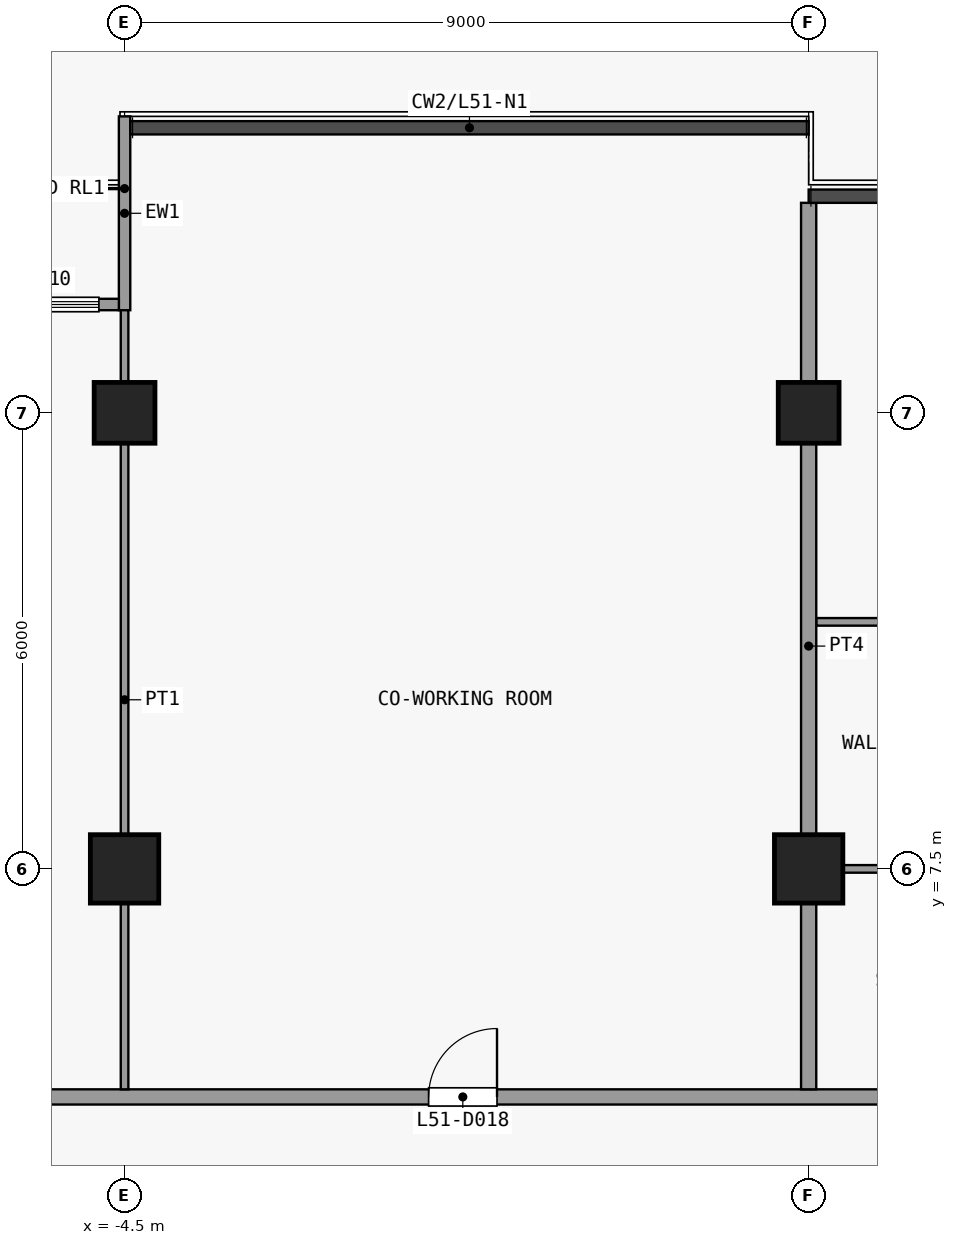
"""IFC4 building model, lengths in metres.
Left out: names, types, materials, properties, quantities, classifications, styles, units other than length and angle.
Written with IfcOpenShell. Run it as: python <this file> out.ifc"""

import sys

from ifc_helpers import new_model, si_unit, direction, frame, frame_2d, origin, origin_2d, place, context, subcontext, project, spatial, rectangle, extrude, element, fill, save


model = new_model("IFC4")
c1 = context("Model", 3, precision=1e-05, world=origin(), true_north=direction((0.0, 1.0)))
c2 = subcontext(c1, "Body", "Model", "MODEL_VIEW")
j1 = project(units=[si_unit("LENGTHUNIT", "METRE"), si_unit("PLANEANGLEUNIT", "RADIAN")], contexts=[c1])
p1 = place(None, origin())
s1 = spatial("IfcSite", under=j1, at=p1, CompositionType="ELEMENT")
p2 = place(p1, origin())
s2 = spatial("IfcBuilding", under=s1, at=p2, CompositionType="ELEMENT")
p3 = place(p2, frame((0.0, 0.0, 205.1)))
s3 = spatial("IfcBuildingStorey", under=s2, at=p3, CompositionType="ELEMENT", Elevation=205.1)
p4 = place(p3, frame((-4.5, 7.5, 0.0), z_axis=(0.0, 0.0, 1.0), x_axis=(1.0, 0.0, 0.0)))
e1 = element("IfcColumn", 1, at=p4, inside=s3, PredefinedType="COLUMN", context=c2, shape_type="SweptSolid", body=[
    extrude(rectangle(XDim=0.9, YDim=0.9, at=origin_2d()), origin(), (0.0, 0.0, 1.0), 3.6),
])
p5 = place(p3, frame((-4.5, 13.5, 0.0), z_axis=(0.0, 0.0, 1.0), x_axis=(1.0, 0.0, 0.0)))
e2 = element("IfcColumn", 2, at=p5, inside=s3, PredefinedType="COLUMN", context=c2, shape_type="SweptSolid", body=[
    extrude(rectangle(XDim=0.8, YDim=0.8, at=origin_2d()), origin(), (0.0, 0.0, 1.0), 3.6),
])
p6 = place(p3, frame((4.5, 7.5, 0.0), z_axis=(0.0, 0.0, 1.0), x_axis=(1.0, 0.0, 0.0)))
e3 = element("IfcColumn", 3, at=p6, inside=s3, PredefinedType="COLUMN", context=c2, shape_type="SweptSolid", body=[
    extrude(rectangle(XDim=0.9, YDim=0.9, at=origin_2d()), origin(), (0.0, 0.0, 1.0), 3.6),
])
p7 = place(p3, frame((4.5, 13.5, 0.0), z_axis=(0.0, 0.0, 1.0), x_axis=(1.0, 0.0, 0.0)))
e4 = element("IfcColumn", 4, at=p7, inside=s3, PredefinedType="COLUMN", context=c2, shape_type="SweptSolid", body=[
    extrude(rectangle(XDim=0.8, YDim=0.8, at=origin_2d()), origin(), (0.0, 0.0, 1.0), 3.6),
])
p8 = place(p3, frame((-4.5, 14.85, 0.0), z_axis=(0.0, 0.0, 1.0), x_axis=(0.0, 1.0, 0.0)))
e5 = element("IfcWall", 5, at=p8, inside=s3, PredefinedType="SOLIDWALL", context=c2, shape_type="SweptSolid", body=[
    extrude(rectangle(XDim=2.55, YDim=0.15, at=frame_2d((1.275, 0.0))), origin(), (0.0, 0.0, 1.0), 3.3),
])
p9 = place(p3, frame((-10.425, 14.925, 0.0), z_axis=(0.0, 0.0, 1.0), x_axis=(1.0, 0.0, 0.0)))
e6 = element("IfcWall", 6, at=p9, inside=s3, PredefinedType="SOLIDWALL", context=c2, shape_type="SweptSolid", body=[
    extrude(rectangle(XDim=5.85, YDim=0.15, at=frame_2d((2.925, 0.0))), origin(), (0.0, 0.0, 1.0), 3.3),
])
p10 = place(p9, frame((2.325, 0.0, 0.0)))
e7 = element("IfcOpeningElement", 7, at=p10, cuts=e6, PredefinedType="OPENING", context=c2, shape_type="SweptSolid", body=[
    extrude(rectangle(XDim=1.2, YDim=2.4, at=frame_2d((0.6, 1.2))), frame((0.0, 0.085, 0.0), z_axis=(0.0, -1.0, 0.0), x_axis=(1.0, 0.0, 0.0)), (0.0, 0.0, 1.0), 0.17),
])
p11 = place(p9, frame((0.262, 0.0, 0.9)))
e8 = element("IfcOpeningElement", 8, at=p11, cuts=e6, PredefinedType="OPENING", context=c2, shape_type="SweptSolid", body=[
    extrude(rectangle(XDim=1.8, YDim=2.1, at=frame_2d((0.9, 1.05))), frame((0.0, 0.085, 0.0), z_axis=(0.0, -1.0, 0.0), x_axis=(1.0, 0.0, 0.0)), (0.0, 0.0, 1.0), 0.17),
])
p12 = place(p9, frame((3.788, 0.0, 0.9)))
e9 = element("IfcOpeningElement", 9, at=p12, cuts=e6, PredefinedType="OPENING", context=c2, shape_type="SweptSolid", body=[
    extrude(rectangle(XDim=1.8, YDim=2.1, at=frame_2d((0.9, 1.05))), frame((0.0, 0.085, 0.0), z_axis=(0.0, -1.0, 0.0), x_axis=(1.0, 0.0, 0.0)), (0.0, 0.0, 1.0), 0.17),
])
p13 = place(p3, frame((-19.35, 4.5, 0.0), z_axis=(0.0, 0.0, 1.0), x_axis=(1.0, 0.0, 0.0)))
e10 = element("IfcWall", 10, at=p13, inside=s3, PredefinedType="PARTITIONING", context=c2, shape_type="SweptSolid", body=[
    extrude(rectangle(XDim=38.7, YDim=0.2, at=frame_2d((19.35, 0.0))), origin(), (0.0, 0.0, 1.0), 3.3),
])
p14 = place(p13, frame((4.55, 0.0, 0.0)))
e11 = element("IfcOpeningElement", 11, at=p14, cuts=e10, PredefinedType="OPENING", context=c2, shape_type="SweptSolid", body=[
    extrude(rectangle(XDim=1.0, YDim=2.1, at=frame_2d((0.5, 1.05))), frame((0.0, 0.11, 0.0), z_axis=(0.0, -1.0, 0.0), x_axis=(1.0, 0.0, 0.0)), (0.0, 0.0, 1.0), 0.22),
])
p15 = place(p13, frame((11.35, 0.0, 0.0)))
e12 = element("IfcOpeningElement", 12, at=p15, cuts=e10, PredefinedType="OPENING", context=c2, shape_type="SweptSolid", body=[
    extrude(rectangle(XDim=0.9, YDim=2.1, at=frame_2d((0.45, 1.05))), frame((0.0, 0.11, 0.0), z_axis=(0.0, -1.0, 0.0), x_axis=(1.0, 0.0, 0.0)), (0.0, 0.0, 1.0), 0.22),
])
p16 = place(p13, frame((18.85, 0.0, 0.0)))
e13 = element("IfcOpeningElement", 13, at=p16, cuts=e10, PredefinedType="OPENING", context=c2, shape_type="SweptSolid", body=[
    extrude(rectangle(XDim=0.9, YDim=2.1, at=frame_2d((0.45, 1.05))), frame((0.0, 0.11, 0.0), z_axis=(0.0, -1.0, 0.0), x_axis=(1.0, 0.0, 0.0)), (0.0, 0.0, 1.0), 0.22),
])
p17 = place(p13, frame((30.55, 0.0, 0.0)))
e14 = element("IfcOpeningElement", 14, at=p17, cuts=e10, PredefinedType="OPENING", context=c2, shape_type="SweptSolid", body=[
    extrude(rectangle(XDim=1.0, YDim=2.1, at=frame_2d((0.5, 1.05))), frame((0.0, 0.11, 0.0), z_axis=(0.0, -1.0, 0.0), x_axis=(1.0, 0.0, 0.0)), (0.0, 0.0, 1.0), 0.22),
])
p18 = place(p3, frame((4.6, 7.5, 0.0), z_axis=(0.0, 0.0, 1.0), x_axis=(1.0, 0.0, 0.0)))
e15 = element("IfcWall", 15, at=p18, inside=s3, PredefinedType="PARTITIONING", context=c2, shape_type="SweptSolid", body=[
    extrude(rectangle(XDim=2.4, YDim=0.1, at=frame_2d((1.2, 0.0))), origin(), (0.0, 0.0, 1.0), 3.3),
])
p19 = place(p3, frame((4.6, 10.75, 0.0), z_axis=(0.0, 0.0, 1.0), x_axis=(1.0, 0.0, 0.0)))
e16 = element("IfcWall", 16, at=p19, inside=s3, PredefinedType="PARTITIONING", context=c2, shape_type="SweptSolid", body=[
    extrude(rectangle(XDim=3.2, YDim=0.1, at=frame_2d((1.6, 0.0))), origin(), (0.0, 0.0, 1.0), 3.3),
])
p20 = place(p19, frame((1.1, 0.0, 0.0)))
e17 = element("IfcOpeningElement", 17, at=p20, cuts=e16, PredefinedType="OPENING", context=c2, shape_type="SweptSolid", body=[
    extrude(rectangle(XDim=0.9, YDim=2.1, at=frame_2d((0.45, 1.05))), frame((0.0, 0.06, 0.0), z_axis=(0.0, -1.0, 0.0), x_axis=(1.0, 0.0, 0.0)), (0.0, 0.0, 1.0), 0.12),
])
p21 = place(p3, frame((-4.5, 4.6, 0.0), z_axis=(0.0, 0.0, 1.0), x_axis=(0.0, 1.0, 0.0)))
e18 = element("IfcWall", 18, at=p21, inside=s3, PredefinedType="PARTITIONING", context=c2, shape_type="SweptSolid", body=[
    extrude(rectangle(XDim=10.25, YDim=0.1, at=frame_2d((5.125, 0.0))), origin(), (0.0, 0.0, 1.0), 3.3),
])
p22 = place(p3, frame((4.5, 4.6, 0.0), z_axis=(0.0, 0.0, 1.0), x_axis=(0.0, 1.0, 0.0)))
e19 = element("IfcWall", 19, at=p22, inside=s3, PredefinedType="PARTITIONING", context=c2, shape_type="SweptSolid", body=[
    extrude(rectangle(XDim=11.662, YDim=0.2, at=frame_2d((5.831, 0.0))), origin(), (0.0, 0.0, 1.0), 3.3),
])
p23 = place(p12, origin())
e20 = element("IfcWindow", 20, at=p23, inside=s3, PartitioningType="SINGLE_PANEL", PredefinedType="WINDOW", context=c2, shape_type="SweptSolid", body=[
    extrude(rectangle(XDim=1.8, YDim=2.1, at=frame_2d((0.9, 1.05))), frame((0.0, 0.03, 0.0), z_axis=(0.0, -1.0, 0.0), x_axis=(1.0, 0.0, 0.0)), (0.0, 0.0, 1.0), 0.06),
])
fill(e9, e20)
p24 = place(p16, origin())
e21 = element("IfcDoor", 21, at=p24, inside=s3, OperationType="SINGLE_SWING_LEFT", PredefinedType="DOOR", context=c2, shape_type="SweptSolid", body=[
    extrude(rectangle(XDim=0.9, YDim=2.1, at=frame_2d((0.45, 1.05))), frame((0.0, 0.025, 0.0), z_axis=(0.0, -1.0, 0.0), x_axis=(1.0, 0.0, 0.0)), (0.0, 0.0, 1.0), 0.05),
])
fill(e13, e21)
save(model, sys.argv[1])
